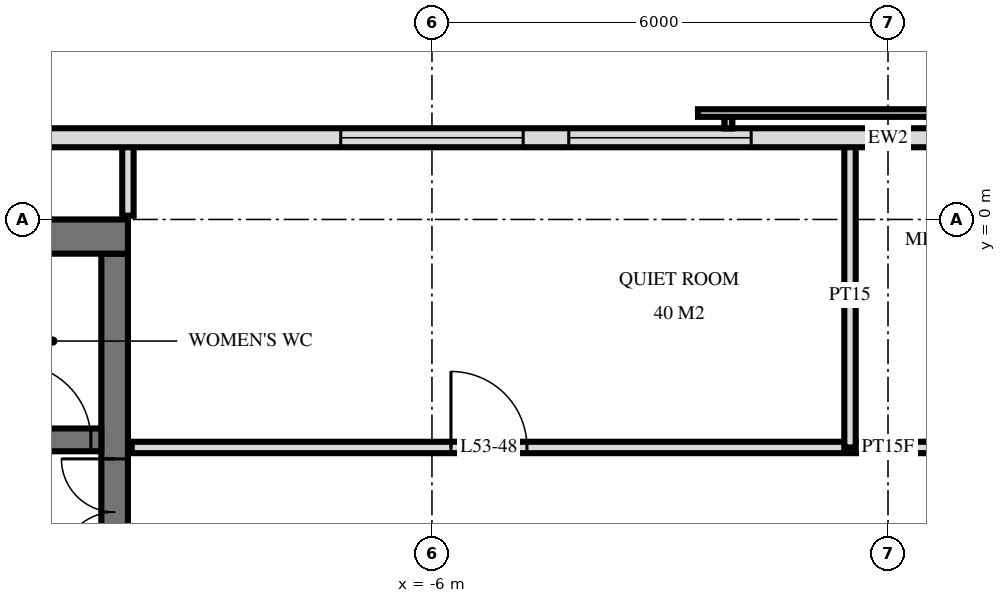
"""IFC4 building model, lengths in metres.
Left out: names, types, materials, properties, quantities, classifications, styles, units other than length and angle.
Written with IfcOpenShell. Run it as: python <this file> out.ifc"""

import sys

from ifc_helpers import new_model, si_unit, direction, frame, frame_2d, origin, place, context, subcontext, project, spatial, rectangle, extrude, element, fill, save


model = new_model("IFC4")
c1 = context("Model", 3, precision=1e-05, world=origin(), true_north=direction((0.0, 1.0)))
c2 = subcontext(c1, "Body", "Model", "MODEL_VIEW")
j1 = project(units=[si_unit("LENGTHUNIT", "METRE"), si_unit("PLANEANGLEUNIT", "RADIAN")], contexts=[c1])
p1 = place(None, origin())
s1 = spatial("IfcSite", under=j1, at=p1, CompositionType="ELEMENT")
p2 = place(p1, origin())
s2 = spatial("IfcBuilding", under=s1, at=p2, CompositionType="ELEMENT")
p3 = place(p2, frame((0.0, 0.0, 204.6)))
s3 = spatial("IfcBuildingStorey", under=s2, at=p3, CompositionType="ELEMENT", Elevation=204.6)
p4 = place(p3, frame((-24.5, -0.225, 0.0), z_axis=(0.0, 0.0, 1.0), x_axis=(1.0, 0.0, 0.0)))
e1 = element("IfcWall", 1, at=p4, inside=s3, PredefinedType="SHEAR", context=c2, shape_type="SweptSolid", body=[
    extrude(rectangle(XDim=14.5, YDim=0.45, at=frame_2d((7.25, 0.0))), origin(), (0.0, 0.0, 1.0), 3.5),
])
p5 = place(p3, frame((-10.175, -14.55, 0.0), z_axis=(0.0, 0.0, 1.0), x_axis=(0.0, 1.0, 0.0)))
e2 = element("IfcWall", 2, at=p5, inside=s3, PredefinedType="SHEAR", context=c2, shape_type="SweptSolid", body=[
    extrude(rectangle(XDim=14.1, YDim=0.35, at=frame_2d((7.05, 0.0))), origin(), (0.0, 0.0, 1.0), 3.5),
])
p6 = place(p5, frame((8.4, 0.0, 0.0)))
e3 = element("IfcOpeningElement", 3, at=p6, cuts=e2, PredefinedType="OPENING", context=c2, shape_type="SweptSolid", body=[
    extrude(rectangle(XDim=1.4, YDim=2.4, at=frame_2d((0.7, 1.2))), frame((0.0, 0.185, 0.0), z_axis=(0.0, -1.0, 0.0), x_axis=(1.0, 0.0, 0.0)), (0.0, 0.0, 1.0), 0.37),
])
p7 = place(p5, frame((10.0, 0.0, 0.0)))
e4 = element("IfcOpeningElement", 4, at=p7, cuts=e2, PredefinedType="OPENING", context=c2, shape_type="SweptSolid", body=[
    extrude(rectangle(XDim=1.4, YDim=2.4, at=frame_2d((0.7, 1.2))), frame((0.0, 0.185, 0.0), z_axis=(0.0, -1.0, 0.0), x_axis=(1.0, 0.0, 0.0)), (0.0, 0.0, 1.0), 0.37),
])
p8 = place(p5, frame((4.0, 0.0, 0.0)))
e5 = element("IfcOpeningElement", 5, at=p8, cuts=e2, PredefinedType="OPENING", context=c2, shape_type="SweptSolid", body=[
    extrude(rectangle(XDim=1.2, YDim=2.1, at=frame_2d((0.6, 1.05))), frame((0.0, 0.185, 0.0), z_axis=(0.0, -1.0, 0.0), x_axis=(1.0, 0.0, 0.0)), (0.0, 0.0, 1.0), 0.37),
])
p9 = place(p3, frame((-24.05, -2.9, 0.0), z_axis=(0.0, 0.0, 1.0), x_axis=(1.0, 0.0, 0.0)))
e6 = element("IfcWall", 6, at=p9, inside=s3, PredefinedType="SHEAR", context=c2, shape_type="SweptSolid", body=[
    extrude(rectangle(XDim=13.7, YDim=0.3, at=frame_2d((6.85, 0.0))), origin(), (0.0, 0.0, 1.0), 3.5),
])
p10 = place(p9, frame((0.55, 0.0, 0.0)))
e7 = element("IfcOpeningElement", 7, at=p10, cuts=e6, PredefinedType="OPENING", context=c2, shape_type="SweptSolid", body=[
    extrude(rectangle(XDim=1.1, YDim=2.1, at=frame_2d((0.55, 1.05))), frame((0.0, 0.16, 0.0), z_axis=(0.0, -1.0, 0.0), x_axis=(1.0, 0.0, 0.0)), (0.0, 0.0, 1.0), 0.32),
])
p11 = place(p9, frame((6.613, 0.0, 0.0)))
e8 = element("IfcOpeningElement", 8, at=p11, cuts=e6, PredefinedType="OPENING", context=c2, shape_type="SweptSolid", body=[
    extrude(rectangle(XDim=0.9, YDim=2.1, at=frame_2d((0.45, 1.05))), frame((0.0, 0.16, 0.0), z_axis=(0.0, -1.0, 0.0), x_axis=(1.0, 0.0, 0.0)), (0.0, 0.0, 1.0), 0.32),
])
p12 = place(p9, frame((5.188, 0.0, 0.0)))
e9 = element("IfcOpeningElement", 9, at=p12, cuts=e6, PredefinedType="OPENING", context=c2, shape_type="SweptSolid", body=[
    extrude(rectangle(XDim=0.9, YDim=2.1, at=frame_2d((0.45, 1.05))), frame((0.0, 0.16, 0.0), z_axis=(0.0, -1.0, 0.0), x_axis=(1.0, 0.0, 0.0)), (0.0, 0.0, 1.0), 0.32),
])
p13 = place(p9, frame((12.562, 0.0, 0.0)))
e10 = element("IfcOpeningElement", 10, at=p13, cuts=e6, PredefinedType="OPENING", context=c2, shape_type="SweptSolid", body=[
    extrude(rectangle(XDim=1.0, YDim=2.1, at=frame_2d((0.5, 1.05))), frame((0.0, 0.16, 0.0), z_axis=(0.0, -1.0, 0.0), x_axis=(1.0, 0.0, 0.0)), (0.0, 0.0, 1.0), 0.32),
])
p14 = place(p9, frame((11.137, 0.0, 0.0)))
e11 = element("IfcOpeningElement", 11, at=p14, cuts=e6, PredefinedType="OPENING", context=c2, shape_type="SweptSolid", body=[
    extrude(rectangle(XDim=1.0, YDim=2.1, at=frame_2d((0.5, 1.05))), frame((0.0, 0.16, 0.0), z_axis=(0.0, -1.0, 0.0), x_axis=(1.0, 0.0, 0.0)), (0.0, 0.0, 1.0), 0.32),
])
p15 = place(p9, frame((8.85, 0.0, 0.0)))
e12 = element("IfcOpeningElement", 12, at=p15, cuts=e6, PredefinedType="OPENING", context=c2, shape_type="SweptSolid", body=[
    extrude(rectangle(XDim=1.0, YDim=2.1, at=frame_2d((0.5, 1.05))), frame((0.0, 0.16, 0.0), z_axis=(0.0, -1.0, 0.0), x_axis=(1.0, 0.0, 0.0)), (0.0, 0.0, 1.0), 0.32),
])
p16 = place(p9, frame((3.0, 0.0, 0.0)))
e13 = element("IfcOpeningElement", 13, at=p16, cuts=e6, PredefinedType="OPENING", context=c2, shape_type="SweptSolid", body=[
    extrude(rectangle(XDim=1.0, YDim=2.1, at=frame_2d((0.5, 1.05))), frame((0.0, 0.16, 0.0), z_axis=(0.0, -1.0, 0.0), x_axis=(1.0, 0.0, 0.0)), (0.0, 0.0, 1.0), 0.32),
])
p17 = place(p3, frame((22.475, 1.075, 0.0), z_axis=(0.0, 0.0, 1.0), x_axis=(-1.0, 0.0, 0.0)))
e14 = element("IfcWall", 14, at=p17, inside=s3, PredefinedType="SOLIDWALL", context=c2, shape_type="SweptSolid", body=[
    extrude(rectangle(XDim=44.951, YDim=0.25, at=frame_2d((22.475, 0.0))), origin(), (0.0, 0.0, 1.0), 3.22),
])
p18 = place(p17, frame((18.275, 0.0, 0.9)))
e15 = element("IfcOpeningElement", 15, at=p18, cuts=e14, PredefinedType="OPENING", context=c2, shape_type="SweptSolid", body=[
    extrude(rectangle(XDim=2.4, YDim=1.5, at=frame_2d((1.2, 0.75))), frame((0.0, 0.135, 0.0), z_axis=(0.0, -1.0, 0.0), x_axis=(1.0, 0.0, 0.0)), (0.0, 0.0, 1.0), 0.27),
])
p19 = place(p17, frame((24.275, 0.0, 0.9)))
e16 = element("IfcOpeningElement", 16, at=p19, cuts=e14, PredefinedType="OPENING", context=c2, shape_type="SweptSolid", body=[
    extrude(rectangle(XDim=2.4, YDim=1.5, at=frame_2d((1.2, 0.75))), frame((0.0, 0.135, 0.0), z_axis=(0.0, -1.0, 0.0), x_axis=(1.0, 0.0, 0.0)), (0.0, 0.0, 1.0), 0.27),
])
p20 = place(p17, frame((27.275, 0.0, 0.9)))
e17 = element("IfcOpeningElement", 17, at=p20, cuts=e14, PredefinedType="OPENING", context=c2, shape_type="SweptSolid", body=[
    extrude(rectangle(XDim=2.4, YDim=1.5, at=frame_2d((1.2, 0.75))), frame((0.0, 0.135, 0.0), z_axis=(0.0, -1.0, 0.0), x_axis=(1.0, 0.0, 0.0)), (0.0, 0.0, 1.0), 0.27),
])
p21 = place(p3, frame((-0.5, -3.0, 0.0), z_axis=(0.0, 0.0, 1.0), x_axis=(0.0, 1.0, 0.0)))
e18 = element("IfcWall", 18, at=p21, inside=s3, PredefinedType="PARTITIONING", context=c2, shape_type="SweptSolid", body=[
    extrude(rectangle(XDim=4.02, YDim=0.15, at=frame_2d((2.01, 0.0))), origin(), (0.0, 0.0, 1.0), 3.22),
])
p22 = place(p3, frame((-10.0, 0.05, 0.0), z_axis=(0.0, 0.0, 1.0), x_axis=(0.0, 1.0, 0.0)))
e19 = element("IfcWall", 19, at=p22, inside=s3, PredefinedType="PARTITIONING", context=c2, shape_type="SweptSolid", body=[
    extrude(rectangle(XDim=0.97, YDim=0.15, at=frame_2d((0.485, 0.0))), origin(), (0.0, 0.0, 1.0), 3.22),
])
p23 = place(p3, frame((-9.95, -3.0, 0.0), z_axis=(0.0, 0.0, 1.0), x_axis=(1.0, 0.0, 0.0)))
e20 = element("IfcWall", 20, at=p23, inside=s3, PredefinedType="PARTITIONING", context=c2, shape_type="SweptSolid", body=[
    extrude(rectangle(XDim=19.9, YDim=0.15, at=frame_2d((9.95, 0.0))), origin(), (0.0, 0.0, 1.0), 3.22),
])
p24 = place(p23, frame((4.2, 0.0, 0.0)))
e21 = element("IfcOpeningElement", 21, at=p24, cuts=e20, PredefinedType="OPENING", context=c2, shape_type="SweptSolid", body=[
    extrude(rectangle(XDim=1.0, YDim=2.1, at=frame_2d((0.5, 1.05))), frame((0.0, 0.085, 0.0), z_axis=(0.0, -1.0, 0.0), x_axis=(1.0, 0.0, 0.0)), (0.0, 0.0, 1.0), 0.17),
])
p25 = place(p23, frame((11.45, 0.0, 0.0)))
e22 = element("IfcOpeningElement", 22, at=p25, cuts=e20, PredefinedType="OPENING", context=c2, shape_type="SweptSolid", body=[
    extrude(rectangle(XDim=1.0, YDim=2.1, at=frame_2d((0.5, 1.05))), frame((0.0, 0.085, 0.0), z_axis=(0.0, -1.0, 0.0), x_axis=(1.0, 0.0, 0.0)), (0.0, 0.0, 1.0), 0.17),
])
p26 = place(p23, frame((15.45, 0.0, 0.0)))
e23 = element("IfcOpeningElement", 23, at=p26, cuts=e20, PredefinedType="OPENING", context=c2, shape_type="SweptSolid", body=[
    extrude(rectangle(XDim=1.0, YDim=2.1, at=frame_2d((0.5, 1.05))), frame((0.0, 0.085, 0.0), z_axis=(0.0, -1.0, 0.0), x_axis=(1.0, 0.0, 0.0)), (0.0, 0.0, 1.0), 0.17),
])
p27 = place(p23, frame((18.2, 0.0, 0.0)))
e24 = element("IfcOpeningElement", 24, at=p27, cuts=e20, PredefinedType="OPENING", context=c2, shape_type="SweptSolid", body=[
    extrude(rectangle(XDim=1.0, YDim=2.1, at=frame_2d((0.5, 1.05))), frame((0.0, 0.085, 0.0), z_axis=(0.0, -1.0, 0.0), x_axis=(1.0, 0.0, 0.0)), (0.0, 0.0, 1.0), 0.17),
])
p28 = place(p19, origin())
e25 = element("IfcWindow", 25, at=p28, inside=s3, PartitioningType="SINGLE_PANEL", PredefinedType="WINDOW", context=c2, shape_type="SweptSolid", body=[
    extrude(rectangle(XDim=2.4, YDim=1.5, at=frame_2d((1.2, 0.75))), frame((0.0, 0.03, 0.0), z_axis=(0.0, -1.0, 0.0), x_axis=(1.0, 0.0, 0.0)), (0.0, 0.0, 1.0), 0.06),
])
fill(e16, e25)
p29 = place(p20, origin())
e26 = element("IfcWindow", 26, at=p29, inside=s3, PartitioningType="SINGLE_PANEL", PredefinedType="WINDOW", context=c2, shape_type="SweptSolid", body=[
    extrude(rectangle(XDim=2.4, YDim=1.5, at=frame_2d((1.2, 0.75))), frame((0.0, 0.03, 0.0), z_axis=(0.0, -1.0, 0.0), x_axis=(1.0, 0.0, 0.0)), (0.0, 0.0, 1.0), 0.06),
])
fill(e17, e26)
p30 = place(p7, origin())
e27 = element("IfcDoor", 27, at=p30, inside=s3, OperationType="DOUBLE_DOOR_SINGLE_SWING", PredefinedType="DOOR", context=c2, shape_type="SweptSolid", body=[
    extrude(rectangle(XDim=1.4, YDim=2.4, at=frame_2d((0.7, 1.2))), frame((0.0, 0.025, 0.0), z_axis=(0.0, -1.0, 0.0), x_axis=(1.0, 0.0, 0.0)), (0.0, 0.0, 1.0), 0.05),
])
fill(e4, e27)
p31 = place(p13, origin())
e28 = element("IfcDoor", 28, at=p31, inside=s3, OperationType="SINGLE_SWING_RIGHT", PredefinedType="DOOR", context=c2, shape_type="SweptSolid", body=[
    extrude(rectangle(XDim=1.0, YDim=2.1, at=frame_2d((0.5, 1.05))), frame((0.0, 0.025, 0.0), z_axis=(0.0, -1.0, 0.0), x_axis=(1.0, 0.0, 0.0)), (0.0, 0.0, 1.0), 0.05),
])
fill(e10, e28)
p32 = place(p24, origin())
e29 = element("IfcDoor", 29, at=p32, inside=s3, OperationType="SINGLE_SWING_RIGHT", PredefinedType="DOOR", context=c2, shape_type="SweptSolid", body=[
    extrude(rectangle(XDim=1.0, YDim=2.1, at=frame_2d((0.5, 1.05))), frame((0.0, 0.025, 0.0), z_axis=(0.0, -1.0, 0.0), x_axis=(1.0, 0.0, 0.0)), (0.0, 0.0, 1.0), 0.05),
])
fill(e21, e29)
save(model, sys.argv[1])
